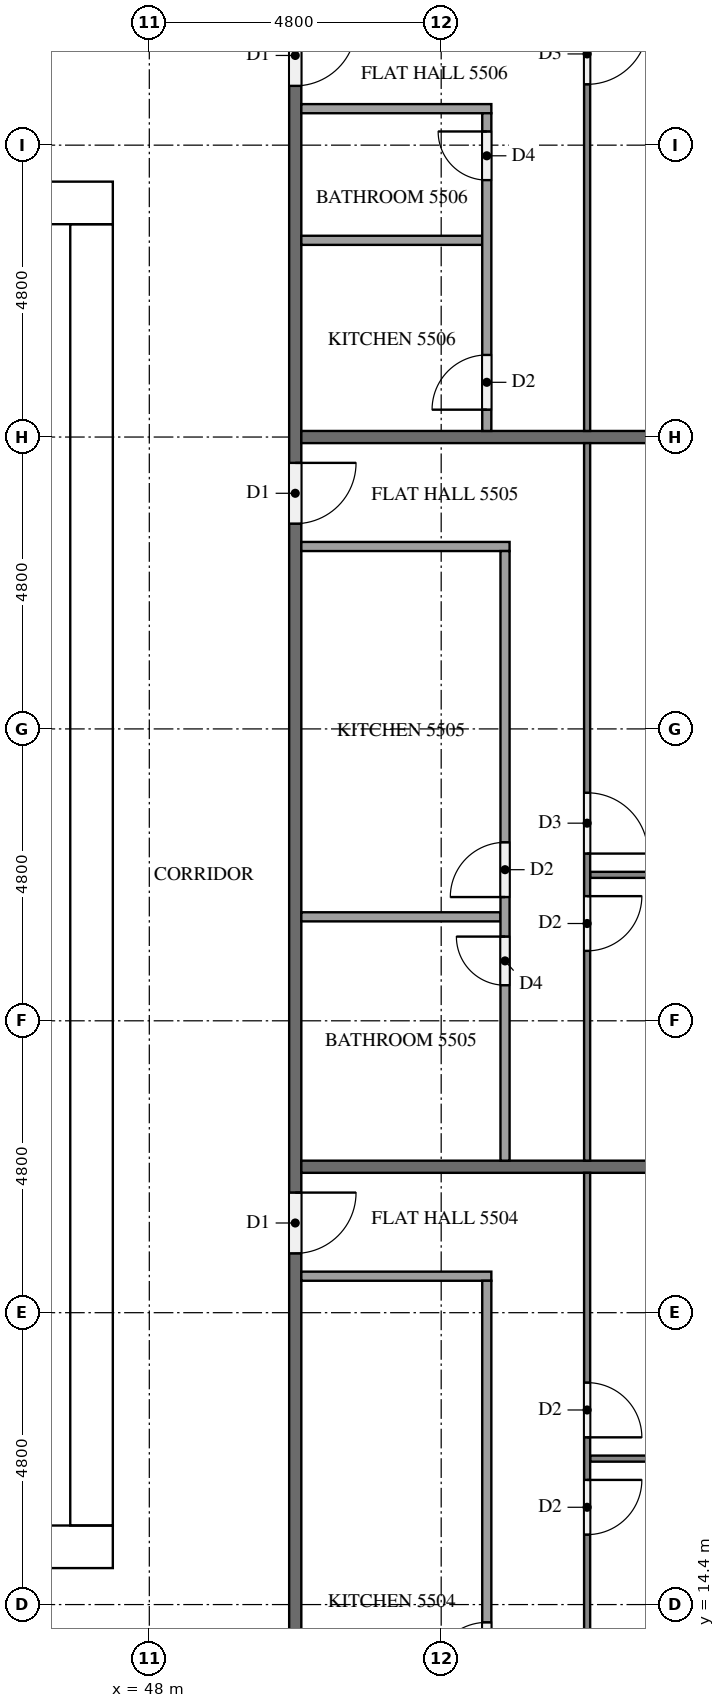
"""IFC4 building model, lengths in metres.
Left out: names, types, materials, properties, quantities, classifications, styles, units other than length and angle.
Written with IfcOpenShell. Run it as: python <this file> out.ifc"""

import sys

from ifc_helpers import new_model, si_unit, direction, frame, frame_2d, origin, place, context, subcontext, project, spatial, rectangle, extrude, element, fill, save


model = new_model("IFC4")
c1 = context("Model", 3, precision=1e-05, world=origin(), true_north=direction((0.0, 1.0)))
c2 = subcontext(c1, "Body", "Model", "MODEL_VIEW")
j1 = project(units=[si_unit("LENGTHUNIT", "METRE"), si_unit("PLANEANGLEUNIT", "RADIAN")], contexts=[c1])
p1 = place(None, origin())
s1 = spatial("IfcSite", under=j1, at=p1, CompositionType="ELEMENT")
p2 = place(p1, origin())
s2 = spatial("IfcBuilding", under=s1, at=p2, CompositionType="ELEMENT")
p3 = place(p2, frame((0.0, 0.0, 212.3)))
s3 = spatial("IfcBuildingStorey", under=s2, at=p3, CompositionType="ELEMENT", Elevation=212.3)
p4 = place(p3, frame((15.0, 15.35, 0.0), z_axis=(0.0, 0.0, 1.0), x_axis=(1.0, 0.0, 0.0)))
e1 = element("IfcWall", 1, at=p4, inside=s3, PredefinedType="SHEAR", context=c2, shape_type="SweptSolid", body=[
    extrude(rectangle(XDim=32.4, YDim=0.7, at=frame_2d((16.2, 0.0))), origin(), (0.0, 0.0, 1.0), 3.2),
])
p5 = place(p4, frame((15.3, 0.0, 0.0)))
e2 = element("IfcOpeningElement", 2, at=p5, cuts=e1, PredefinedType="OPENING", context=c2, shape_type="SweptSolid", body=[
    extrude(rectangle(XDim=1.8, YDim=2.1, at=frame_2d((0.9, 1.05))), frame((0.0, 0.36, 0.0), z_axis=(0.0, -1.0, 0.0), x_axis=(1.0, 0.0, 0.0)), (0.0, 0.0, 1.0), 0.72),
])
p6 = place(p3, frame((15.0, 37.45, 0.0), z_axis=(0.0, 0.0, 1.0), x_axis=(1.0, 0.0, 0.0)))
e3 = element("IfcWall", 3, at=p6, inside=s3, PredefinedType="SHEAR", context=c2, shape_type="SweptSolid", body=[
    extrude(rectangle(XDim=32.4, YDim=0.7, at=frame_2d((16.2, 0.0))), origin(), (0.0, 0.0, 1.0), 3.2),
])
p7 = place(p6, frame((15.3, 0.0, 0.0)))
e4 = element("IfcOpeningElement", 4, at=p7, cuts=e3, PredefinedType="OPENING", context=c2, shape_type="SweptSolid", body=[
    extrude(rectangle(XDim=1.8, YDim=2.1, at=frame_2d((0.9, 1.05))), frame((0.0, 0.36, 0.0), z_axis=(0.0, -1.0, 0.0), x_axis=(1.0, 0.0, 0.0)), (0.0, 0.0, 1.0), 0.72),
])
p8 = place(p6, frame((1.544, 0.0, 0.0)))
e5 = element("IfcOpeningElement", 5, at=p8, cuts=e3, PredefinedType="OPENING", context=c2, shape_type="SweptSolid", body=[
    extrude(rectangle(XDim=1.0, YDim=2.1, at=frame_2d((0.5, 1.05))), frame((0.0, 0.36, 0.0), z_axis=(0.0, -1.0, 0.0), x_axis=(1.0, 0.0, 0.0)), (0.0, 0.0, 1.0), 0.72),
])
p9 = place(p6, frame((5.219, 0.0, 0.0)))
e6 = element("IfcOpeningElement", 6, at=p9, cuts=e3, PredefinedType="OPENING", context=c2, shape_type="SweptSolid", body=[
    extrude(rectangle(XDim=1.0, YDim=2.1, at=frame_2d((0.5, 1.05))), frame((0.0, 0.36, 0.0), z_axis=(0.0, -1.0, 0.0), x_axis=(1.0, 0.0, 0.0)), (0.0, 0.0, 1.0), 0.72),
])
p10 = place(p3, frame((47.05, 15.7, 0.0), z_axis=(0.0, 0.0, 1.0), x_axis=(0.0, 1.0, 0.0)))
e7 = element("IfcWall", 7, at=p10, inside=s3, PredefinedType="SHEAR", context=c2, shape_type="SweptSolid", body=[
    extrude(rectangle(XDim=21.4, YDim=0.7, at=frame_2d((10.7, 0.0))), origin(), (0.0, 0.0, 1.0), 3.2),
])
p11 = place(p10, frame((10.4, 0.0, 0.0)))
e8 = element("IfcOpeningElement", 8, at=p11, cuts=e7, PredefinedType="OPENING", context=c2, shape_type="SweptSolid", body=[
    extrude(rectangle(XDim=1.2, YDim=2.1, at=frame_2d((0.6, 1.05))), frame((0.0, 0.36, 0.0), z_axis=(0.0, -1.0, 0.0), x_axis=(1.0, 0.0, 0.0)), (0.0, 0.0, 1.0), 0.72),
])
p12 = place(p3, frame((50.4, 40.7, 0.0), z_axis=(0.0, 0.0, 1.0), x_axis=(0.0, -1.0, 0.0)))
e9 = element("IfcWall", 9, at=p12, inside=s3, PredefinedType="PARTITIONING", context=c2, shape_type="SweptSolid", body=[
    extrude(rectangle(XDim=28.6, YDim=0.2, at=frame_2d((14.3, 0.0))), origin(), (0.0, 0.0, 1.0), 3.2),
])
p13 = place(p12, frame((19.525, 0.0, 0.0)))
e10 = element("IfcOpeningElement", 10, at=p13, cuts=e9, PredefinedType="OPENING", context=c2, shape_type="SweptSolid", body=[
    extrude(rectangle(XDim=1.0, YDim=2.1, at=frame_2d((0.5, 1.05))), frame((0.0, 0.11, 0.0), z_axis=(0.0, -1.0, 0.0), x_axis=(1.0, 0.0, 0.0)), (0.0, 0.0, 1.0), 0.22),
])
p14 = place(p12, frame((7.525, 0.0, 0.0)))
e11 = element("IfcOpeningElement", 11, at=p14, cuts=e9, PredefinedType="OPENING", context=c2, shape_type="SweptSolid", body=[
    extrude(rectangle(XDim=1.0, YDim=2.1, at=frame_2d((0.5, 1.05))), frame((0.0, 0.11, 0.0), z_axis=(0.0, -1.0, 0.0), x_axis=(1.0, 0.0, 0.0)), (0.0, 0.0, 1.0), 0.22),
])
p15 = place(p12, frame((0.325, 0.0, 0.0)))
e12 = element("IfcOpeningElement", 12, at=p15, cuts=e9, PredefinedType="OPENING", context=c2, shape_type="SweptSolid", body=[
    extrude(rectangle(XDim=1.0, YDim=2.1, at=frame_2d((0.5, 1.05))), frame((0.0, 0.11, 0.0), z_axis=(0.0, -1.0, 0.0), x_axis=(1.0, 0.0, 0.0)), (0.0, 0.0, 1.0), 0.22),
])
for number, where, z_axis, x_axis in (
    (13, (50.5, 21.6, 0.0), (0.0, 0.0, 1.0), (1.0, 0.0, 0.0)),
    (14, (50.5, 33.6, 0.0), (0.0, 0.0, 1.0), (1.0, 0.0, 0.0)),
):
    element("IfcWall", number, at=place(p3, frame(where, z_axis=z_axis, x_axis=x_axis)), inside=s3, PredefinedType="PARTITIONING", context=c2, shape_type="SweptSolid", body=[
        extrude(rectangle(XDim=11.8, YDim=0.2, at=frame_2d((5.9, 0.0))), origin(), (0.0, 0.0, 1.0), 3.2),
    ])
p16 = place(p3, frame((55.25, 16.8, 0.0), z_axis=(0.0, 0.0, 1.0), x_axis=(1.0, 0.0, 0.0)))
e15 = element("IfcWall", 15, at=p16, inside=s3, PredefinedType="PARTITIONING", context=c2, shape_type="SweptSolid", body=[
    extrude(rectangle(XDim=7.05, YDim=0.1, at=frame_2d((3.525, 0.0))), origin(), (0.0, 0.0, 1.0), 3.2),
])
p17 = place(p3, frame((55.2, 21.5, 0.0), z_axis=(0.0, 0.0, 1.0), x_axis=(0.0, -1.0, 0.0)))
e16 = element("IfcWall", 16, at=p17, inside=s3, PredefinedType="PARTITIONING", context=c2, shape_type="SweptSolid", body=[
    extrude(rectangle(XDim=16.6, YDim=0.1, at=frame_2d((8.3, 0.0))), origin(), (0.0, 0.0, 1.0), 3.2),
])
p18 = place(p17, frame((3.45, 0.0, 0.0)))
e17 = element("IfcOpeningElement", 17, at=p18, cuts=e16, PredefinedType="OPENING", context=c2, shape_type="SweptSolid", body=[
    extrude(rectangle(XDim=0.9, YDim=2.1, at=frame_2d((0.45, 1.05))), frame((0.0, 0.06, 0.0), z_axis=(0.0, -1.0, 0.0), x_axis=(1.0, 0.0, 0.0)), (0.0, 0.0, 1.0), 0.12),
])
p19 = place(p17, frame((5.05, 0.0, 0.0)))
e18 = element("IfcOpeningElement", 18, at=p19, cuts=e16, PredefinedType="OPENING", context=c2, shape_type="SweptSolid", body=[
    extrude(rectangle(XDim=0.9, YDim=2.1, at=frame_2d((0.45, 1.05))), frame((0.0, 0.06, 0.0), z_axis=(0.0, -1.0, 0.0), x_axis=(1.0, 0.0, 0.0)), (0.0, 0.0, 1.0), 0.12),
])
p20 = place(p17, frame((15.3, 0.0, 0.0)))
e19 = element("IfcOpeningElement", 19, at=p20, cuts=e16, PredefinedType="OPENING", context=c2, shape_type="SweptSolid", body=[
    extrude(rectangle(XDim=1.0, YDim=2.1, at=frame_2d((0.5, 1.05))), frame((0.0, 0.06, 0.0), z_axis=(0.0, -1.0, 0.0), x_axis=(1.0, 0.0, 0.0)), (0.0, 0.0, 1.0), 0.12),
])
p21 = place(p3, frame((50.5, 19.8, 0.0), z_axis=(0.0, 0.0, 1.0), x_axis=(1.0, 0.0, 0.0)))
e20 = element("IfcWall", 20, at=p21, inside=s3, PredefinedType="PARTITIONING", context=c2, shape_type="SweptSolid", body=[
    extrude(rectangle(XDim=3.125, YDim=0.15, at=frame_2d((1.562, 0.0))), origin(), (0.0, 0.0, 1.0), 3.2),
])
p22 = place(p3, frame((53.55, 4.9, 0.0), z_axis=(0.0, 0.0, 1.0), x_axis=(0.0, 1.0, 0.0)))
e21 = element("IfcWall", 21, at=p22, inside=s3, PredefinedType="PARTITIONING", context=c2, shape_type="SweptSolid", body=[
    extrude(rectangle(XDim=14.825, YDim=0.15, at=frame_2d((7.413, 0.0))), origin(), (0.0, 0.0, 1.0), 3.2),
])
p23 = place(p22, frame((8.308, 0.0, 0.0)))
e22 = element("IfcOpeningElement", 22, at=p23, cuts=e21, PredefinedType="OPENING", context=c2, shape_type="SweptSolid", body=[
    extrude(rectangle(XDim=0.9, YDim=2.1, at=frame_2d((0.45, 1.05))), frame((0.0, 0.085, 0.0), z_axis=(0.0, -1.0, 0.0), x_axis=(1.0, 0.0, 0.0)), (0.0, 0.0, 1.0), 0.17),
])
p24 = place(p22, frame((6.858, 0.0, 0.0)))
e23 = element("IfcOpeningElement", 23, at=p24, cuts=e21, PredefinedType="OPENING", context=c2, shape_type="SweptSolid", body=[
    extrude(rectangle(XDim=0.8, YDim=2.1, at=frame_2d((0.4, 1.05))), frame((0.0, 0.085, 0.0), z_axis=(0.0, -1.0, 0.0), x_axis=(1.0, 0.0, 0.0)), (0.0, 0.0, 1.0), 0.17),
])
p25 = place(p22, frame((0.35, 0.0, 0.0)))
e24 = element("IfcOpeningElement", 24, at=p25, cuts=e21, PredefinedType="OPENING", context=c2, shape_type="SweptSolid", body=[
    extrude(rectangle(XDim=0.9, YDim=2.1, at=frame_2d((0.45, 1.05))), frame((0.0, 0.085, 0.0), z_axis=(0.0, -1.0, 0.0), x_axis=(1.0, 0.0, 0.0)), (0.0, 0.0, 1.0), 0.17),
])
p26 = place(p3, frame((55.25, 26.4, 0.0), z_axis=(0.0, 0.0, 1.0), x_axis=(1.0, 0.0, 0.0)))
e25 = element("IfcWall", 25, at=p26, inside=s3, PredefinedType="PARTITIONING", context=c2, shape_type="SweptSolid", body=[
    extrude(rectangle(XDim=7.05, YDim=0.1, at=frame_2d((3.525, 0.0))), origin(), (0.0, 0.0, 1.0), 3.2),
])
p27 = place(p3, frame((55.2, 33.5, 0.0), z_axis=(0.0, 0.0, 1.0), x_axis=(0.0, -1.0, 0.0)))
e26 = element("IfcWall", 26, at=p27, inside=s3, PredefinedType="PARTITIONING", context=c2, shape_type="SweptSolid", body=[
    extrude(rectangle(XDim=11.8, YDim=0.1, at=frame_2d((5.9, 0.0))), origin(), (0.0, 0.0, 1.0), 3.2),
])
p28 = place(p27, frame((5.75, 0.0, 0.0)))
e27 = element("IfcOpeningElement", 27, at=p28, cuts=e26, PredefinedType="OPENING", context=c2, shape_type="SweptSolid", body=[
    extrude(rectangle(XDim=1.0, YDim=2.1, at=frame_2d((0.5, 1.05))), frame((0.0, 0.06, 0.0), z_axis=(0.0, -1.0, 0.0), x_axis=(1.0, 0.0, 0.0)), (0.0, 0.0, 1.0), 0.12),
])
p29 = place(p27, frame((7.45, 0.0, 0.0)))
e28 = element("IfcOpeningElement", 28, at=p29, cuts=e26, PredefinedType="OPENING", context=c2, shape_type="SweptSolid", body=[
    extrude(rectangle(XDim=0.9, YDim=2.1, at=frame_2d((0.45, 1.05))), frame((0.0, 0.06, 0.0), z_axis=(0.0, -1.0, 0.0), x_axis=(1.0, 0.0, 0.0)), (0.0, 0.0, 1.0), 0.12),
])
p30 = place(p3, frame((50.5, 25.71, 0.0), z_axis=(0.0, 0.0, 1.0), x_axis=(1.0, 0.0, 0.0)))
e29 = element("IfcWall", 29, at=p30, inside=s3, PredefinedType="PARTITIONING", context=c2, shape_type="SweptSolid", body=[
    extrude(rectangle(XDim=3.275, YDim=0.15, at=frame_2d((1.637, 0.0))), origin(), (0.0, 0.0, 1.0), 3.2),
])
p31 = place(p3, frame((50.5, 31.8, 0.0), z_axis=(0.0, 0.0, 1.0), x_axis=(1.0, 0.0, 0.0)))
e30 = element("IfcWall", 30, at=p31, inside=s3, PredefinedType="PARTITIONING", context=c2, shape_type="SweptSolid", body=[
    extrude(rectangle(XDim=3.425, YDim=0.15, at=frame_2d((1.712, 0.0))), origin(), (0.0, 0.0, 1.0), 3.2),
])
p32 = place(p3, frame((53.85, 21.7, 0.0), z_axis=(0.0, 0.0, 1.0), x_axis=(0.0, 1.0, 0.0)))
e31 = element("IfcWall", 31, at=p32, inside=s3, PredefinedType="PARTITIONING", context=c2, shape_type="SweptSolid", body=[
    extrude(rectangle(XDim=10.025, YDim=0.15, at=frame_2d((5.013, 0.0))), origin(), (0.0, 0.0, 1.0), 3.2),
])
p33 = place(p32, frame((4.335, 0.0, 0.0)))
e32 = element("IfcOpeningElement", 32, at=p33, cuts=e31, PredefinedType="OPENING", context=c2, shape_type="SweptSolid", body=[
    extrude(rectangle(XDim=0.9, YDim=2.1, at=frame_2d((0.45, 1.05))), frame((0.0, 0.085, 0.0), z_axis=(0.0, -1.0, 0.0), x_axis=(1.0, 0.0, 0.0)), (0.0, 0.0, 1.0), 0.17),
])
p34 = place(p32, frame((2.885, 0.0, 0.0)))
e33 = element("IfcOpeningElement", 33, at=p34, cuts=e31, PredefinedType="OPENING", context=c2, shape_type="SweptSolid", body=[
    extrude(rectangle(XDim=0.8, YDim=2.1, at=frame_2d((0.4, 1.05))), frame((0.0, 0.085, 0.0), z_axis=(0.0, -1.0, 0.0), x_axis=(1.0, 0.0, 0.0)), (0.0, 0.0, 1.0), 0.17),
])
p35 = place(p3, frame((55.2, 40.7, 0.0), z_axis=(0.0, 0.0, 1.0), x_axis=(0.0, -1.0, 0.0)))
e34 = element("IfcWall", 34, at=p35, inside=s3, PredefinedType="PARTITIONING", context=c2, shape_type="SweptSolid", body=[
    extrude(rectangle(XDim=7.0, YDim=0.1, at=frame_2d((3.5, 0.0))), origin(), (0.0, 0.0, 1.0), 3.2),
])
p36 = place(p35, frame((0.3, 0.0, 0.0)))
e35 = element("IfcOpeningElement", 35, at=p36, cuts=e34, PredefinedType="OPENING", context=c2, shape_type="SweptSolid", body=[
    extrude(rectangle(XDim=1.0, YDim=2.1, at=frame_2d((0.5, 1.05))), frame((0.0, 0.06, 0.0), z_axis=(0.0, -1.0, 0.0), x_axis=(1.0, 0.0, 0.0)), (0.0, 0.0, 1.0), 0.12),
])
p37 = place(p3, frame((50.5, 36.835, 0.0), z_axis=(0.0, 0.0, 1.0), x_axis=(1.0, 0.0, 0.0)))
e36 = element("IfcWall", 36, at=p37, inside=s3, PredefinedType="PARTITIONING", context=c2, shape_type="SweptSolid", body=[
    extrude(rectangle(XDim=2.975, YDim=0.15, at=frame_2d((1.488, 0.0))), origin(), (0.0, 0.0, 1.0), 3.2),
])
p38 = place(p3, frame((50.5, 39.0, 0.0), z_axis=(0.0, 0.0, 1.0), x_axis=(1.0, 0.0, 0.0)))
e37 = element("IfcWall", 37, at=p38, inside=s3, PredefinedType="PARTITIONING", context=c2, shape_type="SweptSolid", body=[
    extrude(rectangle(XDim=3.125, YDim=0.15, at=frame_2d((1.562, 0.0))), origin(), (0.0, 0.0, 1.0), 3.2),
])
p39 = place(p3, frame((53.55, 33.7, 0.0), z_axis=(0.0, 0.0, 1.0), x_axis=(0.0, 1.0, 0.0)))
e38 = element("IfcWall", 38, at=p39, inside=s3, PredefinedType="PARTITIONING", context=c2, shape_type="SweptSolid", body=[
    extrude(rectangle(XDim=5.225, YDim=0.15, at=frame_2d((2.613, 0.0))), origin(), (0.0, 0.0, 1.0), 3.2),
])
p40 = place(p39, frame((4.125, 0.0, 0.0)))
e39 = element("IfcOpeningElement", 39, at=p40, cuts=e38, PredefinedType="OPENING", context=c2, shape_type="SweptSolid", body=[
    extrude(rectangle(XDim=0.8, YDim=2.1, at=frame_2d((0.4, 1.05))), frame((0.0, 0.085, 0.0), z_axis=(0.0, -1.0, 0.0), x_axis=(1.0, 0.0, 0.0)), (0.0, 0.0, 1.0), 0.17),
])
p41 = place(p39, frame((0.35, 0.0, 0.0)))
e40 = element("IfcOpeningElement", 40, at=p41, cuts=e38, PredefinedType="OPENING", context=c2, shape_type="SweptSolid", body=[
    extrude(rectangle(XDim=0.9, YDim=2.1, at=frame_2d((0.45, 1.05))), frame((0.0, 0.085, 0.0), z_axis=(0.0, -1.0, 0.0), x_axis=(1.0, 0.0, 0.0)), (0.0, 0.0, 1.0), 0.17),
])
p42 = place(p11, origin())
e41 = element("IfcDoor", 41, at=p42, inside=s3, OperationType="SINGLE_SWING_LEFT", PredefinedType="DOOR", context=c2, shape_type="SweptSolid", body=[
    extrude(rectangle(XDim=1.2, YDim=2.1, at=frame_2d((0.6, 1.05))), frame((0.0, 0.025, 0.0), z_axis=(0.0, -1.0, 0.0), x_axis=(1.0, 0.0, 0.0)), (0.0, 0.0, 1.0), 0.05),
])
fill(e8, e41)
p43 = place(p13, origin())
e42 = element("IfcDoor", 42, at=p43, inside=s3, OperationType="SINGLE_SWING_LEFT", PredefinedType="DOOR", context=c2, shape_type="SweptSolid", body=[
    extrude(rectangle(XDim=1.0, YDim=2.1, at=frame_2d((0.5, 1.05))), frame((0.0, 0.025, 0.0), z_axis=(0.0, -1.0, 0.0), x_axis=(1.0, 0.0, 0.0)), (0.0, 0.0, 1.0), 0.05),
])
fill(e10, e42)
p44 = place(p14, origin())
e43 = element("IfcDoor", 43, at=p44, inside=s3, OperationType="SINGLE_SWING_LEFT", PredefinedType="DOOR", context=c2, shape_type="SweptSolid", body=[
    extrude(rectangle(XDim=1.0, YDim=2.1, at=frame_2d((0.5, 1.05))), frame((0.0, 0.025, 0.0), z_axis=(0.0, -1.0, 0.0), x_axis=(1.0, 0.0, 0.0)), (0.0, 0.0, 1.0), 0.05),
])
fill(e11, e43)
p45 = place(p15, origin())
e44 = element("IfcDoor", 44, at=p45, inside=s3, OperationType="SINGLE_SWING_LEFT", PredefinedType="DOOR", context=c2, shape_type="SweptSolid", body=[
    extrude(rectangle(XDim=1.0, YDim=2.1, at=frame_2d((0.5, 1.05))), frame((0.0, 0.025, 0.0), z_axis=(0.0, -1.0, 0.0), x_axis=(1.0, 0.0, 0.0)), (0.0, 0.0, 1.0), 0.05),
])
fill(e12, e44)
p46 = place(p18, origin())
e45 = element("IfcDoor", 45, at=p46, inside=s3, OperationType="SINGLE_SWING_RIGHT", PredefinedType="DOOR", context=c2, shape_type="SweptSolid", body=[
    extrude(rectangle(XDim=0.9, YDim=2.1, at=frame_2d((0.45, 1.05))), frame((0.0, 0.025, 0.0), z_axis=(0.0, -1.0, 0.0), x_axis=(1.0, 0.0, 0.0)), (0.0, 0.0, 1.0), 0.05),
])
fill(e17, e45)
p47 = place(p19, origin())
e46 = element("IfcDoor", 46, at=p47, inside=s3, OperationType="SINGLE_SWING_LEFT", PredefinedType="DOOR", context=c2, shape_type="SweptSolid", body=[
    extrude(rectangle(XDim=0.9, YDim=2.1, at=frame_2d((0.45, 1.05))), frame((0.0, 0.025, 0.0), z_axis=(0.0, -1.0, 0.0), x_axis=(1.0, 0.0, 0.0)), (0.0, 0.0, 1.0), 0.05),
])
fill(e18, e46)
p48 = place(p23, origin())
e47 = element("IfcDoor", 47, at=p48, inside=s3, OperationType="SINGLE_SWING_LEFT", PredefinedType="DOOR", context=c2, shape_type="SweptSolid", body=[
    extrude(rectangle(XDim=0.9, YDim=2.1, at=frame_2d((0.45, 1.05))), frame((0.0, 0.025, 0.0), z_axis=(0.0, -1.0, 0.0), x_axis=(1.0, 0.0, 0.0)), (0.0, 0.0, 1.0), 0.05),
])
fill(e22, e47)
p49 = place(p28, origin())
e48 = element("IfcDoor", 48, at=p49, inside=s3, OperationType="SINGLE_SWING_RIGHT", PredefinedType="DOOR", context=c2, shape_type="SweptSolid", body=[
    extrude(rectangle(XDim=1.0, YDim=2.1, at=frame_2d((0.5, 1.05))), frame((0.0, 0.025, 0.0), z_axis=(0.0, -1.0, 0.0), x_axis=(1.0, 0.0, 0.0)), (0.0, 0.0, 1.0), 0.05),
])
fill(e27, e48)
p50 = place(p29, origin())
e49 = element("IfcDoor", 49, at=p50, inside=s3, OperationType="SINGLE_SWING_LEFT", PredefinedType="DOOR", context=c2, shape_type="SweptSolid", body=[
    extrude(rectangle(XDim=0.9, YDim=2.1, at=frame_2d((0.45, 1.05))), frame((0.0, 0.025, 0.0), z_axis=(0.0, -1.0, 0.0), x_axis=(1.0, 0.0, 0.0)), (0.0, 0.0, 1.0), 0.05),
])
fill(e28, e49)
p51 = place(p33, origin())
e50 = element("IfcDoor", 50, at=p51, inside=s3, OperationType="SINGLE_SWING_LEFT", PredefinedType="DOOR", context=c2, shape_type="SweptSolid", body=[
    extrude(rectangle(XDim=0.9, YDim=2.1, at=frame_2d((0.45, 1.05))), frame((0.0, 0.025, 0.0), z_axis=(0.0, -1.0, 0.0), x_axis=(1.0, 0.0, 0.0)), (0.0, 0.0, 1.0), 0.05),
])
fill(e32, e50)
p52 = place(p34, origin())
e51 = element("IfcDoor", 51, at=p52, inside=s3, OperationType="SINGLE_SWING_RIGHT", PredefinedType="DOOR", context=c2, shape_type="SweptSolid", body=[
    extrude(rectangle(XDim=0.8, YDim=2.1, at=frame_2d((0.4, 1.05))), frame((0.0, 0.025, 0.0), z_axis=(0.0, -1.0, 0.0), x_axis=(1.0, 0.0, 0.0)), (0.0, 0.0, 1.0), 0.05),
])
fill(e33, e51)
p53 = place(p36, origin())
e52 = element("IfcDoor", 52, at=p53, inside=s3, OperationType="SINGLE_SWING_LEFT", PredefinedType="DOOR", context=c2, shape_type="SweptSolid", body=[
    extrude(rectangle(XDim=1.0, YDim=2.1, at=frame_2d((0.5, 1.05))), frame((0.0, 0.025, 0.0), z_axis=(0.0, -1.0, 0.0), x_axis=(1.0, 0.0, 0.0)), (0.0, 0.0, 1.0), 0.05),
])
fill(e35, e52)
p54 = place(p40, origin())
e53 = element("IfcDoor", 53, at=p54, inside=s3, OperationType="SINGLE_SWING_RIGHT", PredefinedType="DOOR", context=c2, shape_type="SweptSolid", body=[
    extrude(rectangle(XDim=0.8, YDim=2.1, at=frame_2d((0.4, 1.05))), frame((0.0, 0.025, 0.0), z_axis=(0.0, -1.0, 0.0), x_axis=(1.0, 0.0, 0.0)), (0.0, 0.0, 1.0), 0.05),
])
fill(e39, e53)
p55 = place(p41, origin())
e54 = element("IfcDoor", 54, at=p55, inside=s3, OperationType="SINGLE_SWING_LEFT", PredefinedType="DOOR", context=c2, shape_type="SweptSolid", body=[
    extrude(rectangle(XDim=0.9, YDim=2.1, at=frame_2d((0.45, 1.05))), frame((0.0, 0.025, 0.0), z_axis=(0.0, -1.0, 0.0), x_axis=(1.0, 0.0, 0.0)), (0.0, 0.0, 1.0), 0.05),
])
fill(e40, e54)
save(model, sys.argv[1])
